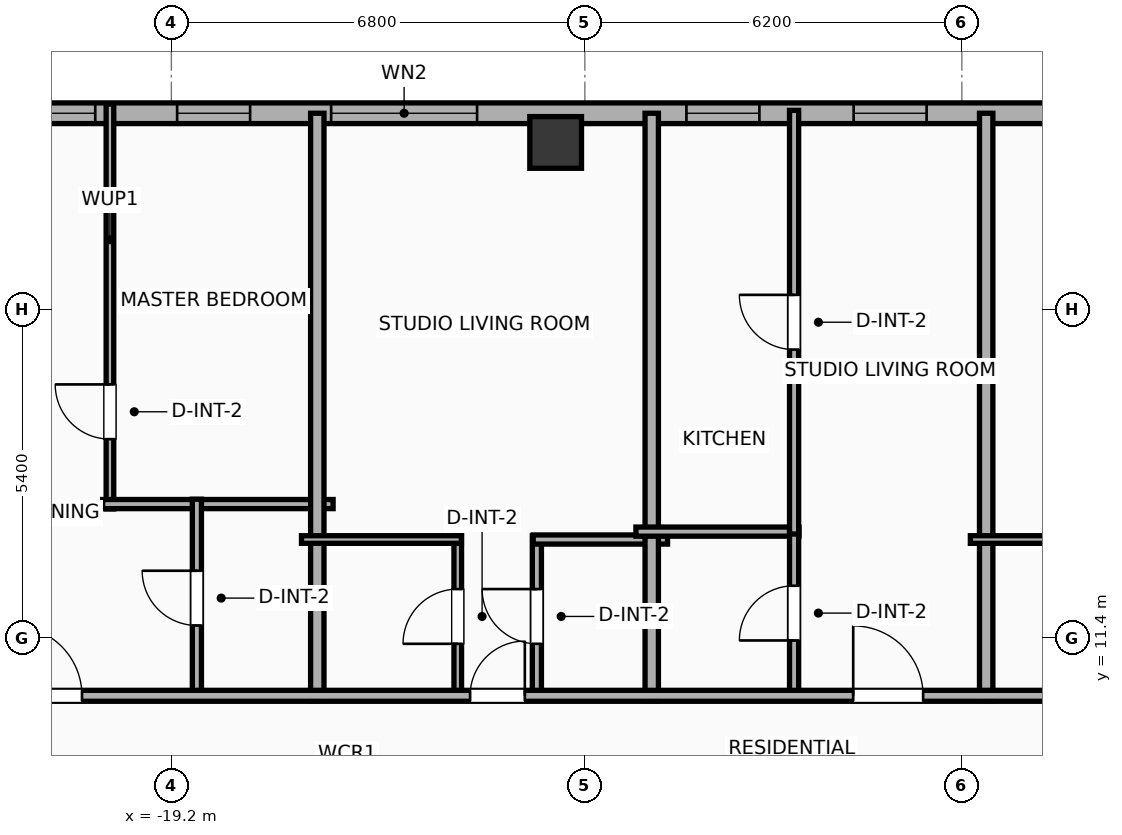
"""IFC4 building model, lengths in metres.
Left out: names, types, materials, properties, quantities, classifications, styles, units other than length and angle.
Written with IfcOpenShell. Run it as: python <this file> out.ifc"""

import sys

from ifc_helpers import new_model, si_unit, direction, frame, frame_2d, origin, origin_2d, place, context, subcontext, project, spatial, rectangle, hollow_rectangle, extrude, element, fill, save


model = new_model("IFC4")
c1 = context("Model", 3, precision=1e-05, world=origin(), true_north=direction((0.0, 1.0)))
c2 = subcontext(c1, "Body", "Model", "MODEL_VIEW")
j1 = project(units=[si_unit("LENGTHUNIT", "METRE"), si_unit("PLANEANGLEUNIT", "RADIAN")], contexts=[c1])
p1 = place(None, origin())
s1 = spatial("IfcSite", under=j1, at=p1, CompositionType="ELEMENT")
p2 = place(p1, origin())
s2 = spatial("IfcBuilding", under=s1, at=p2, CompositionType="ELEMENT")
p3 = place(p2, frame((0.0, 0.0, 204.1)))
s3 = spatial("IfcBuildingStorey", under=s2, at=p3, CompositionType="ELEMENT", Elevation=204.1)
p4 = place(p3, frame((-12.88, 19.55, 0.0), z_axis=(0.0, 0.0, 1.0), x_axis=(1.0, 0.0, 0.0)))
e1 = element("IfcColumn", 1, at=p4, inside=s3, PredefinedType="COLUMN", context=c2, shape_type="SweptSolid", body=[
    extrude(hollow_rectangle(XDim=0.85, YDim=0.85, WallThickness=0.028, at=origin_2d()), origin(), (0.0, 0.0, 1.0), 3.9),
])
p5 = place(p3, frame((-22.783, 20.03, 0.0), z_axis=(0.0, 0.0, 1.0), x_axis=(1.0, 0.0, 0.0)))
e2 = element("IfcWall", 2, at=p5, inside=s3, PredefinedType="ELEMENTEDWALL", context=c2, shape_type="SweptSolid", body=[
    extrude(rectangle(XDim=49.566, YDim=0.34, at=frame_2d((24.783, 0.0))), origin(), (0.0, 0.0, 1.0), 3.65),
])
p6 = place(p5, frame((6.211, 0.0, 0.75)))
e3 = element("IfcOpeningElement", 3, at=p6, cuts=e2, PredefinedType="OPENING", context=c2, shape_type="SweptSolid", body=[
    extrude(rectangle(XDim=2.4, YDim=2.1, at=frame_2d((1.2, 1.05))), frame((0.0, 0.18, 0.0), z_axis=(0.0, -1.0, 0.0), x_axis=(1.0, 0.0, 0.0)), (0.0, 0.0, 1.0), 0.36),
])
p7 = place(p5, frame((22.733, 0.0, 0.75)))
e4 = element("IfcOpeningElement", 4, at=p7, cuts=e2, PredefinedType="OPENING", context=c2, shape_type="SweptSolid", body=[
    extrude(rectangle(XDim=2.4, YDim=2.1, at=frame_2d((1.2, 1.05))), frame((0.0, 0.18, 0.0), z_axis=(0.0, -1.0, 0.0), x_axis=(1.0, 0.0, 0.0)), (0.0, 0.0, 1.0), 0.36),
])
p8 = place(p5, frame((1.132, 0.0, 0.75)))
e5 = element("IfcOpeningElement", 5, at=p8, cuts=e2, PredefinedType="OPENING", context=c2, shape_type="SweptSolid", body=[
    extrude(rectangle(XDim=1.2, YDim=2.05, at=frame_2d((0.6, 1.025))), frame((0.0, 0.18, 0.0), z_axis=(0.0, -1.0, 0.0), x_axis=(1.0, 0.0, 0.0)), (0.0, 0.0, 1.0), 0.36),
])
p9 = place(p5, frame((3.678, 0.0, 0.75)))
e6 = element("IfcOpeningElement", 6, at=p9, cuts=e2, PredefinedType="OPENING", context=c2, shape_type="SweptSolid", body=[
    extrude(rectangle(XDim=1.2, YDim=2.05, at=frame_2d((0.6, 1.025))), frame((0.0, 0.18, 0.0), z_axis=(0.0, -1.0, 0.0), x_axis=(1.0, 0.0, 0.0)), (0.0, 0.0, 1.0), 0.36),
])
p10 = place(p5, frame((14.804, 0.0, 0.75)))
e7 = element("IfcOpeningElement", 7, at=p10, cuts=e2, PredefinedType="OPENING", context=c2, shape_type="SweptSolid", body=[
    extrude(rectangle(XDim=1.2, YDim=2.05, at=frame_2d((0.6, 1.025))), frame((0.0, 0.18, 0.0), z_axis=(0.0, -1.0, 0.0), x_axis=(1.0, 0.0, 0.0)), (0.0, 0.0, 1.0), 0.36),
])
p11 = place(p5, frame((12.054, 0.0, 0.75)))
e8 = element("IfcOpeningElement", 8, at=p11, cuts=e2, PredefinedType="OPENING", context=c2, shape_type="SweptSolid", body=[
    extrude(rectangle(XDim=1.2, YDim=2.05, at=frame_2d((0.6, 1.025))), frame((0.0, 0.18, 0.0), z_axis=(0.0, -1.0, 0.0), x_axis=(1.0, 0.0, 0.0)), (0.0, 0.0, 1.0), 0.36),
])
p12 = place(p5, frame((17.933, 0.0, 0.75)))
e9 = element("IfcOpeningElement", 9, at=p12, cuts=e2, PredefinedType="OPENING", context=c2, shape_type="SweptSolid", body=[
    extrude(rectangle(XDim=1.2, YDim=2.05, at=frame_2d((0.6, 1.025))), frame((0.0, 0.18, 0.0), z_axis=(0.0, -1.0, 0.0), x_axis=(1.0, 0.0, 0.0)), (0.0, 0.0, 1.0), 0.36),
])
p13 = place(p5, frame((26.278, 0.0, 0.75)))
e10 = element("IfcOpeningElement", 10, at=p13, cuts=e2, PredefinedType="OPENING", context=c2, shape_type="SweptSolid", body=[
    extrude(rectangle(XDim=1.2, YDim=2.05, at=frame_2d((0.6, 1.025))), frame((0.0, 0.18, 0.0), z_axis=(0.0, -1.0, 0.0), x_axis=(1.0, 0.0, 0.0)), (0.0, 0.0, 1.0), 0.36),
])
p14 = place(p5, frame((32.677, 0.0, 0.75)))
e11 = element("IfcOpeningElement", 11, at=p14, cuts=e2, PredefinedType="OPENING", context=c2, shape_type="SweptSolid", body=[
    extrude(rectangle(XDim=1.2, YDim=2.05, at=frame_2d((0.6, 1.025))), frame((0.0, 0.18, 0.0), z_axis=(0.0, -1.0, 0.0), x_axis=(1.0, 0.0, 0.0)), (0.0, 0.0, 1.0), 0.36),
])
p15 = place(p5, frame((28.217, 0.0, 0.75)))
e12 = element("IfcOpeningElement", 12, at=p15, cuts=e2, PredefinedType="OPENING", context=c2, shape_type="SweptSolid", body=[
    extrude(rectangle(XDim=0.85, YDim=2.05, at=frame_2d((0.425, 1.025))), frame((0.0, 0.18, 0.0), z_axis=(0.0, -1.0, 0.0), x_axis=(1.0, 0.0, 0.0)), (0.0, 0.0, 1.0), 0.36),
])
p16 = place(p5, frame((36.678, 0.0, 0.75)))
e13 = element("IfcOpeningElement", 13, at=p16, cuts=e2, PredefinedType="OPENING", context=c2, shape_type="SweptSolid", body=[
    extrude(rectangle(XDim=1.2, YDim=2.05, at=frame_2d((0.6, 1.025))), frame((0.0, 0.18, 0.0), z_axis=(0.0, -1.0, 0.0), x_axis=(1.0, 0.0, 0.0)), (0.0, 0.0, 1.0), 0.36),
])
p17 = place(p5, frame((40.307, 0.0, 0.75)))
e14 = element("IfcOpeningElement", 14, at=p17, cuts=e2, PredefinedType="OPENING", context=c2, shape_type="SweptSolid", body=[
    extrude(rectangle(XDim=1.2, YDim=2.05, at=frame_2d((0.6, 1.025))), frame((0.0, 0.18, 0.0), z_axis=(0.0, -1.0, 0.0), x_axis=(1.0, 0.0, 0.0)), (0.0, 0.0, 1.0), 0.36),
])
p18 = place(p5, frame((43.696, 0.0, 0.75)))
e15 = element("IfcOpeningElement", 15, at=p18, cuts=e2, PredefinedType="OPENING", context=c2, shape_type="SweptSolid", body=[
    extrude(rectangle(XDim=1.2, YDim=2.05, at=frame_2d((0.6, 1.025))), frame((0.0, 0.18, 0.0), z_axis=(0.0, -1.0, 0.0), x_axis=(1.0, 0.0, 0.0)), (0.0, 0.0, 1.0), 0.36),
])
p19 = place(p5, frame((46.739, 0.0, 0.75)))
e16 = element("IfcOpeningElement", 16, at=p19, cuts=e2, PredefinedType="OPENING", context=c2, shape_type="SweptSolid", body=[
    extrude(rectangle(XDim=1.2, YDim=2.05, at=frame_2d((0.6, 1.025))), frame((0.0, 0.18, 0.0), z_axis=(0.0, -1.0, 0.0), x_axis=(1.0, 0.0, 0.0)), (0.0, 0.0, 1.0), 0.36),
])
p20 = place(p3, frame((-20.21, 13.523, 0.0), z_axis=(0.0, 0.0, 1.0), x_axis=(0.0, 1.0, 0.0)))
e17 = element("IfcWall", 17, at=p20, inside=s3, PredefinedType="PARTITIONING", context=c2, shape_type="SweptSolid", body=[
    extrude(rectangle(XDim=6.657, YDim=0.125, at=frame_2d((3.329, 0.0))), origin(), (0.0, 0.0, 1.0), 3.65),
])
p21 = place(p20, frame((1.148, 0.0, 0.0)))
e18 = element("IfcOpeningElement", 18, at=p21, cuts=e17, PredefinedType="OPENING", context=c2, shape_type="SweptSolid", body=[
    extrude(rectangle(XDim=0.9, YDim=2.05, at=frame_2d((0.45, 1.025))), frame((0.0, 0.073, 0.0), z_axis=(0.0, -1.0, 0.0), x_axis=(1.0, 0.0, 0.0)), (0.0, 0.0, 1.0), 0.145),
])
p22 = place(p3, frame((-20.33, 13.603, 0.0), z_axis=(0.0, 0.0, 1.0), x_axis=(1.0, 0.0, 0.0)))
e19 = element("IfcWall", 19, at=p22, inside=s3, PredefinedType="PLUMBINGWALL", context=c2, shape_type="SweptSolid", body=[
    extrude(rectangle(XDim=3.79, YDim=0.15, at=frame_2d((1.895, 0.0))), origin(), (0.0, 0.0, 1.0), 3.65),
])
p23 = place(p3, frame((-18.78, 10.43, 0.0), z_axis=(0.0, 0.0, 1.0), x_axis=(0.0, 1.0, 0.0)))
e20 = element("IfcWall", 20, at=p23, inside=s3, PredefinedType="PLUMBINGWALL", context=c2, shape_type="SweptSolid", body=[
    extrude(rectangle(XDim=3.253, YDim=0.15, at=frame_2d((1.626, 0.0))), origin(), (0.0, 0.0, 1.0), 3.65),
])
p24 = place(p23, frame((1.177, 0.0, 0.0)))
e21 = element("IfcOpeningElement", 21, at=p24, cuts=e20, PredefinedType="OPENING", context=c2, shape_type="SweptSolid", body=[
    extrude(rectangle(XDim=0.9, YDim=2.05, at=frame_2d((0.45, 1.025))), frame((0.0, 0.085, 0.0), z_axis=(0.0, -1.0, 0.0), x_axis=(1.0, 0.0, 0.0)), (0.0, 0.0, 1.0), 0.17),
])
p25 = place(p3, frame((-16.8, 10.37, 0.0), z_axis=(0.0, 0.0, 1.0), x_axis=(0.0, 1.0, 0.0)))
e22 = element("IfcWall", 22, at=p25, inside=s3, PredefinedType="PARTITIONING", context=c2, shape_type="SweptSolid", body=[
    extrude(rectangle(XDim=9.66, YDim=0.22, at=frame_2d((4.83, 0.0))), origin(), (0.0, 0.0, 1.0), 3.65),
])
p26 = place(p3, frame((-14.49, 10.43, 0.0), z_axis=(0.0, 0.0, 1.0), x_axis=(0.0, 1.0, 0.0)))
e23 = element("IfcWall", 23, at=p26, inside=s3, PredefinedType="PARTITIONING", context=c2, shape_type="SweptSolid", body=[
    extrude(rectangle(XDim=2.65, YDim=0.125, at=frame_2d((1.325, 0.0))), origin(), (0.0, 0.0, 1.0), 3.65),
])
p27 = place(p26, frame((0.875, 0.0, 0.0)))
e24 = element("IfcOpeningElement", 24, at=p27, cuts=e23, PredefinedType="OPENING", context=c2, shape_type="SweptSolid", body=[
    extrude(rectangle(XDim=0.9, YDim=2.05, at=frame_2d((0.45, 1.025))), frame((0.0, 0.073, 0.0), z_axis=(0.0, -1.0, 0.0), x_axis=(1.0, 0.0, 0.0)), (0.0, 0.0, 1.0), 0.145),
])
p28 = place(p3, frame((-13.189, 10.43, 0.0), z_axis=(0.0, 0.0, 1.0), x_axis=(0.0, 1.0, 0.0)))
e25 = element("IfcWall", 25, at=p28, inside=s3, PredefinedType="PLUMBINGWALL", context=c2, shape_type="SweptSolid", body=[
    extrude(rectangle(XDim=2.65, YDim=0.15, at=frame_2d((1.325, 0.0))), origin(), (0.0, 0.0, 1.0), 3.65),
])
p29 = place(p28, frame((0.875, 0.0, 0.0)))
e26 = element("IfcOpeningElement", 26, at=p29, cuts=e25, PredefinedType="OPENING", context=c2, shape_type="SweptSolid", body=[
    extrude(rectangle(XDim=0.9, YDim=2.05, at=frame_2d((0.45, 1.025))), frame((0.0, 0.085, 0.0), z_axis=(0.0, -1.0, 0.0), x_axis=(1.0, 0.0, 0.0)), (0.0, 0.0, 1.0), 0.17),
])
p30 = place(p3, frame((-17.06, 13.02, 0.0), z_axis=(0.0, 0.0, 1.0), x_axis=(1.0, 0.0, 0.0)))
e27 = element("IfcWall", 27, at=p30, inside=s3, PredefinedType="PARTITIONING", context=c2, shape_type="SweptSolid", body=[
    extrude(rectangle(XDim=2.63, YDim=0.125, at=frame_2d((1.315, 0.0))), origin(), (0.0, 0.0, 1.0), 3.65),
])
p31 = place(p3, frame((-13.249, 13.02, 0.0), z_axis=(0.0, 0.0, 1.0), x_axis=(1.0, 0.0, 0.0)))
e28 = element("IfcWall", 28, at=p31, inside=s3, PredefinedType="PLUMBINGWALL", context=c2, shape_type="SweptSolid", body=[
    extrude(rectangle(XDim=2.209, YDim=0.15, at=frame_2d((1.104, 0.0))), origin(), (0.0, 0.0, 1.0), 3.65),
])
p32 = place(p3, frame((-11.3, 10.37, 0.0), z_axis=(0.0, 0.0, 1.0), x_axis=(0.0, 1.0, 0.0)))
e29 = element("IfcWall", 29, at=p32, inside=s3, PredefinedType="PARTITIONING", context=c2, shape_type="SweptSolid", body=[
    extrude(rectangle(XDim=9.66, YDim=0.22, at=frame_2d((4.83, 0.0))), origin(), (0.0, 0.0, 1.0), 3.65),
])
p33 = place(p3, frame((-11.56, 13.15, 0.0), z_axis=(0.0, 0.0, 1.0), x_axis=(1.0, 0.0, 0.0)))
e30 = element("IfcWall", 30, at=p33, inside=s3, PredefinedType="PLUMBINGWALL", context=c2, shape_type="SweptSolid", body=[
    extrude(rectangle(XDim=2.681, YDim=0.15, at=frame_2d((1.341, 0.0))), origin(), (0.0, 0.0, 1.0), 3.65),
])
p34 = place(p3, frame((-8.959, 10.43, 0.0), z_axis=(0.0, 0.0, 1.0), x_axis=(0.0, 1.0, 0.0)))
e31 = element("IfcWall", 31, at=p34, inside=s3, PredefinedType="PLUMBINGWALL", context=c2, shape_type="SweptSolid", body=[
    extrude(rectangle(XDim=2.76, YDim=0.15, at=frame_2d((1.38, 0.0))), origin(), (0.0, 0.0, 1.0), 3.65),
])
p35 = place(p34, frame((0.93, 0.0, 0.0)))
e32 = element("IfcOpeningElement", 32, at=p35, cuts=e31, PredefinedType="OPENING", context=c2, shape_type="SweptSolid", body=[
    extrude(rectangle(XDim=0.9, YDim=2.05, at=frame_2d((0.45, 1.025))), frame((0.0, 0.085, 0.0), z_axis=(0.0, -1.0, 0.0), x_axis=(1.0, 0.0, 0.0)), (0.0, 0.0, 1.0), 0.17),
])
p36 = place(p3, frame((-8.959, 13.11, 0.0), z_axis=(0.0, 0.0, 1.0), x_axis=(0.0, 1.0, 0.0)))
e33 = element("IfcWall", 33, at=p36, inside=s3, PredefinedType="PLUMBINGWALL", context=c2, shape_type="SweptSolid", body=[
    extrude(rectangle(XDim=6.967, YDim=0.15, at=frame_2d((3.483, 0.0))), origin(), (0.0, 0.0, 1.0), 3.65),
])
p37 = place(p36, frame((3.033, 0.0, 0.0)))
e34 = element("IfcOpeningElement", 34, at=p37, cuts=e33, PredefinedType="OPENING", context=c2, shape_type="SweptSolid", body=[
    extrude(rectangle(XDim=0.9, YDim=2.05, at=frame_2d((0.45, 1.025))), frame((0.0, 0.085, 0.0), z_axis=(0.0, -1.0, 0.0), x_axis=(1.0, 0.0, 0.0)), (0.0, 0.0, 1.0), 0.17),
])
p38 = place(p3, frame((-5.8, 10.37, 0.0), z_axis=(0.0, 0.0, 1.0), x_axis=(0.0, 1.0, 0.0)))
e35 = element("IfcWall", 35, at=p38, inside=s3, PredefinedType="PARTITIONING", context=c2, shape_type="SweptSolid", body=[
    extrude(rectangle(XDim=9.66, YDim=0.22, at=frame_2d((4.83, 0.0))), origin(), (0.0, 0.0, 1.0), 3.65),
])
p39 = place(p3, frame((-6.06, 13.02, 0.0), z_axis=(0.0, 0.0, 1.0), x_axis=(1.0, 0.0, 0.0)))
e36 = element("IfcWall", 36, at=p39, inside=s3, PredefinedType="PARTITIONING", context=c2, shape_type="SweptSolid", body=[
    extrude(rectangle(XDim=2.63, YDim=0.125, at=frame_2d((1.315, 0.0))), origin(), (0.0, 0.0, 1.0), 3.65),
])
p40 = place(p3, frame((-26.23, 10.45, 0.0), z_axis=(0.0, 0.0, 1.0), x_axis=(1.0, 0.0, 0.0)))
e37 = element("IfcWall", 37, at=p40, inside=s3, PredefinedType="PARTITIONING", context=c2, shape_type="SweptSolid", body=[
    extrude(rectangle(XDim=56.46, YDim=0.18, at=frame_2d((28.23, 0.0))), origin(), (0.0, 0.0, 1.0), 3.65),
])
p41 = place(p40, frame((4.41, 0.0, 0.0)))
e38 = element("IfcOpeningElement", 38, at=p41, cuts=e37, PredefinedType="OPENING", context=c2, shape_type="SweptSolid", body=[
    extrude(rectangle(XDim=1.15, YDim=2.05, at=frame_2d((0.575, 1.025))), frame((0.0, 0.1, 0.0), z_axis=(0.0, -1.0, 0.0), x_axis=(1.0, 0.0, 0.0)), (0.0, 0.0, 1.0), 0.2),
])
p42 = place(p40, frame((11.943, 0.0, 0.0)))
e39 = element("IfcOpeningElement", 39, at=p42, cuts=e37, PredefinedType="OPENING", context=c2, shape_type="SweptSolid", body=[
    extrude(rectangle(XDim=0.9, YDim=2.05, at=frame_2d((0.45, 1.025))), frame((0.0, 0.1, 0.0), z_axis=(0.0, -1.0, 0.0), x_axis=(1.0, 0.0, 0.0)), (0.0, 0.0, 1.0), 0.2),
])
p43 = place(p40, frame((18.243, 0.0, 0.0)))
e40 = element("IfcOpeningElement", 40, at=p43, cuts=e37, PredefinedType="OPENING", context=c2, shape_type="SweptSolid", body=[
    extrude(rectangle(XDim=1.15, YDim=2.05, at=frame_2d((0.575, 1.025))), frame((0.0, 0.1, 0.0), z_axis=(0.0, -1.0, 0.0), x_axis=(1.0, 0.0, 0.0)), (0.0, 0.0, 1.0), 0.2),
])
p44 = place(p40, frame((22.941, 0.0, 0.0)))
e41 = element("IfcOpeningElement", 41, at=p44, cuts=e37, PredefinedType="OPENING", context=c2, shape_type="SweptSolid", body=[
    extrude(rectangle(XDim=0.9, YDim=2.05, at=frame_2d((0.45, 1.025))), frame((0.0, 0.1, 0.0), z_axis=(0.0, -1.0, 0.0), x_axis=(1.0, 0.0, 0.0)), (0.0, 0.0, 1.0), 0.2),
])
p45 = place(p40, frame((27.028, 0.0, 0.0)))
e42 = element("IfcOpeningElement", 42, at=p45, cuts=e37, PredefinedType="OPENING", context=c2, shape_type="SweptSolid", body=[
    extrude(rectangle(XDim=1.15, YDim=2.05, at=frame_2d((0.575, 1.025))), frame((0.0, 0.1, 0.0), z_axis=(0.0, -1.0, 0.0), x_axis=(1.0, 0.0, 0.0)), (0.0, 0.0, 1.0), 0.2),
])
p46 = place(p40, frame((36.864, 0.0, 0.0)))
e43 = element("IfcOpeningElement", 43, at=p46, cuts=e37, PredefinedType="OPENING", context=c2, shape_type="SweptSolid", body=[
    extrude(rectangle(XDim=1.15, YDim=2.05, at=frame_2d((0.575, 1.025))), frame((0.0, 0.1, 0.0), z_axis=(0.0, -1.0, 0.0), x_axis=(1.0, 0.0, 0.0)), (0.0, 0.0, 1.0), 0.2),
])
p47 = place(p40, frame((45.655, 0.0, 0.0)))
e44 = element("IfcOpeningElement", 44, at=p47, cuts=e37, PredefinedType="OPENING", context=c2, shape_type="SweptSolid", body=[
    extrude(rectangle(XDim=0.9, YDim=2.05, at=frame_2d((0.45, 1.025))), frame((0.0, 0.1, 0.0), z_axis=(0.0, -1.0, 0.0), x_axis=(1.0, 0.0, 0.0)), (0.0, 0.0, 1.0), 0.2),
])
p48 = place(p40, frame((52.576, 0.0, 0.0)))
e45 = element("IfcOpeningElement", 45, at=p48, cuts=e37, PredefinedType="OPENING", context=c2, shape_type="SweptSolid", body=[
    extrude(rectangle(XDim=1.15, YDim=2.05, at=frame_2d((0.575, 1.025))), frame((0.0, 0.1, 0.0), z_axis=(0.0, -1.0, 0.0), x_axis=(1.0, 0.0, 0.0)), (0.0, 0.0, 1.0), 0.2),
])
p49 = place(p6, origin())
e46 = element("IfcWindow", 46, at=p49, inside=s3, PartitioningType="SINGLE_PANEL", PredefinedType="WINDOW", context=c2, shape_type="SweptSolid", body=[
    extrude(rectangle(XDim=2.4, YDim=2.1, at=frame_2d((1.2, 1.05))), frame((0.0, 0.03, 0.0), z_axis=(0.0, -1.0, 0.0), x_axis=(1.0, 0.0, 0.0)), (0.0, 0.0, 1.0), 0.06),
])
fill(e3, e46)
p50 = place(p8, origin())
e47 = element("IfcWindow", 47, at=p50, inside=s3, PartitioningType="SINGLE_PANEL", PredefinedType="WINDOW", context=c2, shape_type="SweptSolid", body=[
    extrude(rectangle(XDim=1.2, YDim=2.05, at=frame_2d((0.6, 1.025))), frame((0.0, 0.03, 0.0), z_axis=(0.0, -1.0, 0.0), x_axis=(1.0, 0.0, 0.0)), (0.0, 0.0, 1.0), 0.06),
])
fill(e5, e47)
p51 = place(p9, origin())
e48 = element("IfcWindow", 48, at=p51, inside=s3, PartitioningType="SINGLE_PANEL", PredefinedType="WINDOW", context=c2, shape_type="SweptSolid", body=[
    extrude(rectangle(XDim=1.2, YDim=2.05, at=frame_2d((0.6, 1.025))), frame((0.0, 0.03, 0.0), z_axis=(0.0, -1.0, 0.0), x_axis=(1.0, 0.0, 0.0)), (0.0, 0.0, 1.0), 0.06),
])
fill(e6, e48)
p52 = place(p10, origin())
e49 = element("IfcWindow", 49, at=p52, inside=s3, PartitioningType="SINGLE_PANEL", PredefinedType="WINDOW", context=c2, shape_type="SweptSolid", body=[
    extrude(rectangle(XDim=1.2, YDim=2.05, at=frame_2d((0.6, 1.025))), frame((0.0, 0.03, 0.0), z_axis=(0.0, -1.0, 0.0), x_axis=(1.0, 0.0, 0.0)), (0.0, 0.0, 1.0), 0.06),
])
fill(e7, e49)
p53 = place(p11, origin())
e50 = element("IfcWindow", 50, at=p53, inside=s3, PartitioningType="SINGLE_PANEL", PredefinedType="WINDOW", context=c2, shape_type="SweptSolid", body=[
    extrude(rectangle(XDim=1.2, YDim=2.05, at=frame_2d((0.6, 1.025))), frame((0.0, 0.03, 0.0), z_axis=(0.0, -1.0, 0.0), x_axis=(1.0, 0.0, 0.0)), (0.0, 0.0, 1.0), 0.06),
])
fill(e8, e50)
p54 = place(p21, origin())
e51 = element("IfcDoor", 51, at=p54, inside=s3, OperationType="SINGLE_SWING_RIGHT", PredefinedType="DOOR", context=c2, shape_type="SweptSolid", body=[
    extrude(rectangle(XDim=0.9, YDim=2.05, at=frame_2d((0.45, 1.025))), frame((0.0, 0.025, 0.0), z_axis=(0.0, -1.0, 0.0), x_axis=(1.0, 0.0, 0.0)), (0.0, 0.0, 1.0), 0.05),
])
fill(e18, e51)
p55 = place(p24, origin())
e52 = element("IfcDoor", 52, at=p55, inside=s3, OperationType="SINGLE_SWING_RIGHT", PredefinedType="DOOR", context=c2, shape_type="SweptSolid", body=[
    extrude(rectangle(XDim=0.9, YDim=2.05, at=frame_2d((0.45, 1.025))), frame((0.0, 0.025, 0.0), z_axis=(0.0, -1.0, 0.0), x_axis=(1.0, 0.0, 0.0)), (0.0, 0.0, 1.0), 0.05),
])
fill(e21, e52)
p56 = place(p27, origin())
e53 = element("IfcDoor", 53, at=p56, inside=s3, OperationType="SINGLE_SWING_LEFT", PredefinedType="DOOR", context=c2, shape_type="SweptSolid", body=[
    extrude(rectangle(XDim=0.9, YDim=2.05, at=frame_2d((0.45, 1.025))), frame((0.0, 0.025, 0.0), z_axis=(0.0, -1.0, 0.0), x_axis=(1.0, 0.0, 0.0)), (0.0, 0.0, 1.0), 0.05),
])
fill(e24, e53)
p57 = place(p29, origin())
e54 = element("IfcDoor", 54, at=p57, inside=s3, OperationType="SINGLE_SWING_RIGHT", PredefinedType="DOOR", context=c2, shape_type="SweptSolid", body=[
    extrude(rectangle(XDim=0.9, YDim=2.05, at=frame_2d((0.45, 1.025))), frame((0.0, 0.025, 0.0), z_axis=(0.0, -1.0, 0.0), x_axis=(1.0, 0.0, 0.0)), (0.0, 0.0, 1.0), 0.05),
])
fill(e26, e54)
p58 = place(p35, origin())
e55 = element("IfcDoor", 55, at=p58, inside=s3, OperationType="SINGLE_SWING_LEFT", PredefinedType="DOOR", context=c2, shape_type="SweptSolid", body=[
    extrude(rectangle(XDim=0.9, YDim=2.05, at=frame_2d((0.45, 1.025))), frame((0.0, 0.025, 0.0), z_axis=(0.0, -1.0, 0.0), x_axis=(1.0, 0.0, 0.0)), (0.0, 0.0, 1.0), 0.05),
])
fill(e32, e55)
p59 = place(p37, origin())
e56 = element("IfcDoor", 56, at=p59, inside=s3, OperationType="SINGLE_SWING_RIGHT", PredefinedType="DOOR", context=c2, shape_type="SweptSolid", body=[
    extrude(rectangle(XDim=0.9, YDim=2.05, at=frame_2d((0.45, 1.025))), frame((0.0, 0.025, 0.0), z_axis=(0.0, -1.0, 0.0), x_axis=(1.0, 0.0, 0.0)), (0.0, 0.0, 1.0), 0.05),
])
fill(e34, e56)
p60 = place(p41, origin())
e57 = element("IfcDoor", 57, at=p60, inside=s3, OperationType="SINGLE_SWING_LEFT", PredefinedType="DOOR", context=c2, shape_type="SweptSolid", body=[
    extrude(rectangle(XDim=1.15, YDim=2.05, at=frame_2d((0.575, 1.025))), frame((0.0, 0.025, 0.0), z_axis=(0.0, -1.0, 0.0), x_axis=(1.0, 0.0, 0.0)), (0.0, 0.0, 1.0), 0.05),
])
fill(e38, e57)
p61 = place(p42, origin())
e58 = element("IfcDoor", 58, at=p61, inside=s3, OperationType="SINGLE_SWING_RIGHT", PredefinedType="DOOR", context=c2, shape_type="SweptSolid", body=[
    extrude(rectangle(XDim=0.9, YDim=2.05, at=frame_2d((0.45, 1.025))), frame((0.0, 0.025, 0.0), z_axis=(0.0, -1.0, 0.0), x_axis=(1.0, 0.0, 0.0)), (0.0, 0.0, 1.0), 0.05),
])
fill(e39, e58)
p62 = place(p43, origin())
e59 = element("IfcDoor", 59, at=p62, inside=s3, OperationType="SINGLE_SWING_LEFT", PredefinedType="DOOR", context=c2, shape_type="SweptSolid", body=[
    extrude(rectangle(XDim=1.15, YDim=2.05, at=frame_2d((0.575, 1.025))), frame((0.0, 0.025, 0.0), z_axis=(0.0, -1.0, 0.0), x_axis=(1.0, 0.0, 0.0)), (0.0, 0.0, 1.0), 0.05),
])
fill(e40, e59)
save(model, sys.argv[1])
